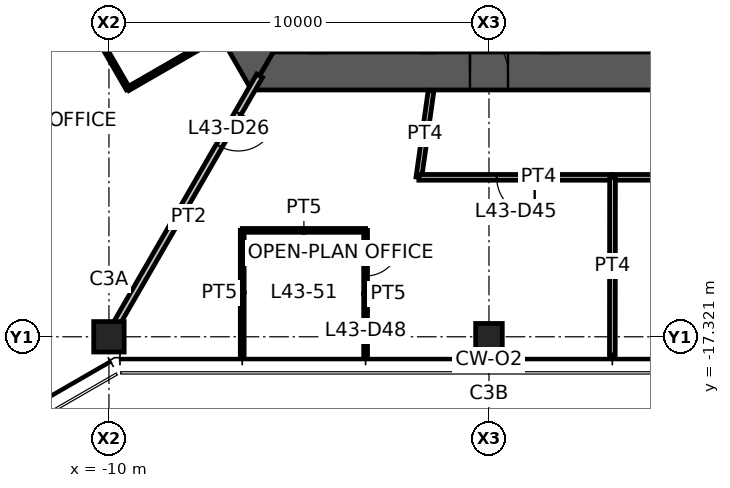
"""IFC4 building model, lengths in metres.
Left out: names, types, materials, properties, quantities, classifications, styles, units other than length and angle.
Written with IfcOpenShell. Run it as: python <this file> out.ifc"""

import sys

from ifc_helpers import new_model, si_unit, direction, frame, frame_2d, origin, origin_2d, place, context, subcontext, project, spatial, polyline, rectangle, hollow_rectangle, outline, extrude, element, fill, save


model = new_model("IFC4")
c1 = context("Model", 3, precision=1e-05, world=origin(), true_north=direction((0.0, 1.0)))
c2 = subcontext(c1, "Body", "Model", "MODEL_VIEW")
j1 = project(units=[si_unit("LENGTHUNIT", "METRE"), si_unit("PLANEANGLEUNIT", "RADIAN")], contexts=[c1])
p1 = place(None, origin())
s1 = spatial("IfcSite", under=j1, at=p1, CompositionType="ELEMENT")
p2 = place(p1, origin())
s2 = spatial("IfcBuilding", under=s1, at=p2, CompositionType="ELEMENT")
p3 = place(p2, frame((0.0, 0.0, 172.1)))
s3 = spatial("IfcBuildingStorey", under=s2, at=p3, CompositionType="ELEMENT", Elevation=172.1)
p4 = place(p3, frame((-10.0, -17.321, 0.0), z_axis=(0.0, 0.0, 1.0), x_axis=(1.0, 0.0, 0.0)))
e1 = element("IfcColumn", 1, at=p4, inside=s3, PredefinedType="COLUMN", context=c2, shape_type="SweptSolid", body=[
    extrude(hollow_rectangle(XDim=0.8, YDim=0.8, WallThickness=0.045, at=origin_2d()), origin(), (0.0, 0.0, 1.0), 3.9),
])
p5 = place(p3, frame((0.0, -17.321, 0.0), z_axis=(0.0, 0.0, 1.0), x_axis=(1.0, 0.0, 0.0)))
e2 = element("IfcColumn", 2, at=p5, inside=s3, PredefinedType="COLUMN", context=c2, shape_type="SweptSolid", body=[
    extrude(hollow_rectangle(XDim=0.7, YDim=0.7, WallThickness=0.036, at=origin_2d()), origin(), (0.0, 0.0, 1.0), 3.9),
])
p6 = place(p3, frame((-11.922, 0.0, 0.0), z_axis=(0.0, 0.0, 1.0), x_axis=(0.500004296715, -0.866022923061, 0.0)))
e3 = element("IfcWall", 3, at=p6, inside=s3, PredefinedType="SHEAR", context=c2, shape_type="SweptSolid", body=[
    extrude(outline(polyline([(-0.289, -0.5), (6.331, -0.5), (7.131, -0.5), (12.211, -0.5), (11.634, 0.5), (7.131, 0.5), (6.331, 0.5), (0.289, 0.5), (-0.289, -0.5)])), origin(), (0.0, 0.0, 1.0), 3.9),
])
p7 = place(p6, frame((6.331, 0.0, 0.0)))
e4 = element("IfcOpeningElement", 4, at=p7, cuts=e3, PredefinedType="OPENING", context=c2, shape_type="SweptSolid", body=[
    extrude(rectangle(XDim=0.8, YDim=2.1, at=frame_2d((0.4, 1.05))), frame((0.0, 0.51, 0.0), z_axis=(0.0, -1.0, 0.0), x_axis=(1.0, 0.0, 0.0)), (0.0, 0.0, 1.0), 1.02),
])
p8 = place(p3, frame((-5.961, -10.325, 0.0), z_axis=(0.0, 0.0, 1.0), x_axis=(1.0, 0.0, 0.0)))
e5 = element("IfcWall", 5, at=p8, inside=s3, PredefinedType="SHEAR", context=c2, shape_type="SweptSolid", body=[
    extrude(outline(polyline([(-0.289, -0.5), (5.461, -0.5), (6.461, -0.5), (12.211, -0.5), (11.634, 0.5), (6.461, 0.5), (5.461, 0.5), (0.289, 0.5), (-0.289, -0.5)])), origin(), (0.0, 0.0, 1.0), 3.9),
])
p9 = place(p8, frame((5.461, 0.0, 0.0)))
e6 = element("IfcOpeningElement", 6, at=p9, cuts=e5, PredefinedType="OPENING", context=c2, shape_type="SweptSolid", body=[
    extrude(rectangle(XDim=1.0, YDim=2.1, at=frame_2d((0.5, 1.05))), frame((0.0, 0.51, 0.0), z_axis=(0.0, -1.0, 0.0), x_axis=(1.0, 0.0, 0.0)), (0.0, 0.0, 1.0), 1.02),
])
p10 = place(p3, frame((-6.035, -10.453, 0.0), z_axis=(0.0, 0.0, 1.0), x_axis=(-0.499989830942, -0.866031274813, 0.0)))
e7 = element("IfcWall", 7, at=p10, inside=s3, PredefinedType="PARTITIONING", context=c2, shape_type="SweptSolid", body=[
    extrude(rectangle(XDim=7.93, YDim=0.175, at=frame_2d((3.965, 0.0))), origin(), (0.0, 0.0, 1.0), 3.05),
])
p11 = place(p10, frame((1.13, 0.0, 0.0)))
e8 = element("IfcOpeningElement", 8, at=p11, cuts=e7, PredefinedType="OPENING", context=c2, shape_type="SweptSolid", body=[
    extrude(rectangle(XDim=1.0, YDim=2.1, at=frame_2d((0.5, 1.05))), frame((0.0, 0.098, 0.0), z_axis=(0.0, -1.0, 0.0), x_axis=(1.0, 0.0, 0.0)), (0.0, 0.0, 1.0), 0.195),
])
p12 = place(p3, frame((-9.5, -10.796, 0.0), z_axis=(0.0, 0.0, 1.0), x_axis=(-0.499990139034, 0.866031096941, 0.0)))
e9 = element("IfcWall", 9, at=p12, inside=s3, PredefinedType="PARTITIONING", context=c2, shape_type="SweptSolid", body=[
    extrude(rectangle(XDim=3.0, YDim=0.1, at=frame_2d((1.5, 0.0))), origin(), (0.0, 0.0, 1.0), 2.95),
])
p13 = place(p12, frame((1.8, 0.0, 0.0)))
e10 = element("IfcOpeningElement", 10, at=p13, cuts=e9, PredefinedType="OPENING", context=c2, shape_type="SweptSolid", body=[
    extrude(rectangle(XDim=0.9, YDim=2.1, at=frame_2d((0.45, 1.05))), frame((0.0, 0.06, 0.0), z_axis=(0.0, -1.0, 0.0), x_axis=(1.0, 0.0, 0.0)), (0.0, 0.0, 1.0), 0.12),
])
p14 = place(p3, frame((-7.092, -9.406, 0.0), z_axis=(0.0, 0.0, 1.0), x_axis=(-0.86603494908, -0.499983466698, 0.0)))
e11 = element("IfcWall", 11, at=p14, inside=s3, PredefinedType="PARTITIONING", context=c2, shape_type="SweptSolid", body=[
    extrude(rectangle(XDim=2.78, YDim=0.1, at=frame_2d((1.39, 0.0))), origin(), (0.0, 0.0, 1.0), 2.95),
])
p15 = place(p3, frame((7.578, -13.125, 0.0), z_axis=(0.0, 0.0, 1.0), x_axis=(-1.0, 0.0, 0.0)))
e12 = element("IfcWall", 12, at=p15, inside=s3, PredefinedType="PARTITIONING", context=c2, shape_type="SweptSolid", body=[
    extrude(rectangle(XDim=4.336, YDim=0.15, at=frame_2d((2.168, 0.0))), origin(), (0.0, 0.0, 1.0), 2.95),
])
p16 = place(p3, frame((-1.844, -13.125, 0.0), z_axis=(0.0, 0.0, 1.0), x_axis=(0.139119980631, 0.990275532864, 0.0)))
e13 = element("IfcWall", 13, at=p16, inside=s3, PredefinedType="PARTITIONING", context=c2, shape_type="SweptSolid", body=[
    extrude(rectangle(XDim=2.302, YDim=0.15, at=frame_2d((1.151, 0.0))), origin(), (0.0, 0.0, 1.0), 2.95),
])
p17 = place(p3, frame((3.251, -13.125, 0.0), z_axis=(0.0, 0.0, 1.0), x_axis=(-1.0, 0.0, 0.0)))
e14 = element("IfcWall", 14, at=p17, inside=s3, PredefinedType="PARTITIONING", context=c2, shape_type="SweptSolid", body=[
    extrude(rectangle(XDim=5.096, YDim=0.15, at=frame_2d((2.548, 0.0))), origin(), (0.0, 0.0, 1.0), 2.95),
])
p18 = place(p17, frame((2.048, 0.0, 0.0)))
e15 = element("IfcOpeningElement", 15, at=p18, cuts=e14, PredefinedType="OPENING", context=c2, shape_type="SweptSolid", body=[
    extrude(rectangle(XDim=1.0, YDim=2.1, at=frame_2d((0.5, 1.05))), frame((0.0, 0.085, 0.0), z_axis=(0.0, -1.0, 0.0), x_axis=(1.0, 0.0, 0.0)), (0.0, 0.0, 1.0), 0.17),
])
p19 = place(p3, frame((-6.493, -17.801, 0.0), z_axis=(0.0, 0.0, 1.0), x_axis=(0.0, 1.0, 0.0)))
e16 = element("IfcWall", 16, at=p19, inside=s3, PredefinedType="PARTITIONING", context=c2, shape_type="SweptSolid", body=[
    extrude(rectangle(XDim=3.28, YDim=0.1, at=frame_2d((1.64, 0.0))), origin(), (0.0, 0.0, 1.0), 2.95),
])
p20 = place(p3, frame((-6.493, -14.521, 0.0), z_axis=(0.0, 0.0, 1.0), x_axis=(1.0, 0.0, 0.0)))
e17 = element("IfcWall", 17, at=p20, inside=s3, PredefinedType="PARTITIONING", context=c2, shape_type="SweptSolid", body=[
    extrude(rectangle(XDim=3.247, YDim=0.1, at=frame_2d((1.623, 0.0))), origin(), (0.0, 0.0, 1.0), 2.95),
])
p21 = place(p3, frame((-3.246, -14.521, 0.0), z_axis=(0.0, 0.0, 1.0), x_axis=(0.0, -1.0, 0.0)))
e18 = element("IfcWall", 18, at=p21, inside=s3, PredefinedType="PARTITIONING", context=c2, shape_type="SweptSolid", body=[
    extrude(rectangle(XDim=3.33, YDim=0.1, at=frame_2d((1.665, 0.0))), origin(), (0.0, 0.0, 1.0), 2.95),
])
p22 = place(p21, frame((0.3, 0.0, 0.0)))
e19 = element("IfcOpeningElement", 19, at=p22, cuts=e18, PredefinedType="OPENING", context=c2, shape_type="SweptSolid", body=[
    extrude(rectangle(XDim=0.9, YDim=2.1, at=frame_2d((0.45, 1.05))), frame((0.0, 0.06, 0.0), z_axis=(0.0, -1.0, 0.0), x_axis=(1.0, 0.0, 0.0)), (0.0, 0.0, 1.0), 0.12),
])
p23 = place(p3, frame((3.246, -17.801, 0.0), z_axis=(0.0, 0.0, 1.0), x_axis=(0.001096662352, 0.999999398666, 0.0)))
e20 = element("IfcWall", 20, at=p23, inside=s3, PredefinedType="PARTITIONING", context=c2, shape_type="SweptSolid", body=[
    extrude(rectangle(XDim=4.675, YDim=0.15, at=frame_2d((2.337, 0.0))), origin(), (0.0, 0.0, 1.0), 2.95),
])
p24 = place(p9, origin())
e21 = element("IfcDoor", 21, at=p24, inside=s3, OperationType="SINGLE_SWING_LEFT", PredefinedType="DOOR", context=c2, shape_type="SweptSolid", body=[
    extrude(rectangle(XDim=1.0, YDim=2.1, at=frame_2d((0.5, 1.05))), frame((0.0, 0.025, 0.0), z_axis=(0.0, -1.0, 0.0), x_axis=(1.0, 0.0, 0.0)), (0.0, 0.0, 1.0), 0.05),
])
fill(e6, e21)
p25 = place(p11, origin())
e22 = element("IfcDoor", 22, at=p25, inside=s3, OperationType="SINGLE_SWING_LEFT", PredefinedType="DOOR", context=c2, shape_type="SweptSolid", body=[
    extrude(rectangle(XDim=1.0, YDim=2.1, at=frame_2d((0.5, 1.05))), frame((0.0, 0.025, 0.0), z_axis=(0.0, -1.0, 0.0), x_axis=(1.0, 0.0, 0.0)), (0.0, 0.0, 1.0), 0.05),
])
fill(e8, e22)
p26 = place(p18, origin())
e23 = element("IfcDoor", 23, at=p26, inside=s3, OperationType="SINGLE_SWING_LEFT", PredefinedType="DOOR", context=c2, shape_type="SweptSolid", body=[
    extrude(rectangle(XDim=1.0, YDim=2.1, at=frame_2d((0.5, 1.05))), frame((0.0, 0.025, 0.0), z_axis=(0.0, -1.0, 0.0), x_axis=(1.0, 0.0, 0.0)), (0.0, 0.0, 1.0), 0.05),
])
fill(e15, e23)
p27 = place(p22, origin())
e24 = element("IfcDoor", 24, at=p27, inside=s3, OperationType="SINGLE_SWING_LEFT", PredefinedType="DOOR", context=c2, shape_type="SweptSolid", body=[
    extrude(rectangle(XDim=0.9, YDim=2.1, at=frame_2d((0.45, 1.05))), frame((0.0, 0.025, 0.0), z_axis=(0.0, -1.0, 0.0), x_axis=(1.0, 0.0, 0.0)), (0.0, 0.0, 1.0), 0.05),
])
fill(e19, e24)
save(model, sys.argv[1])
